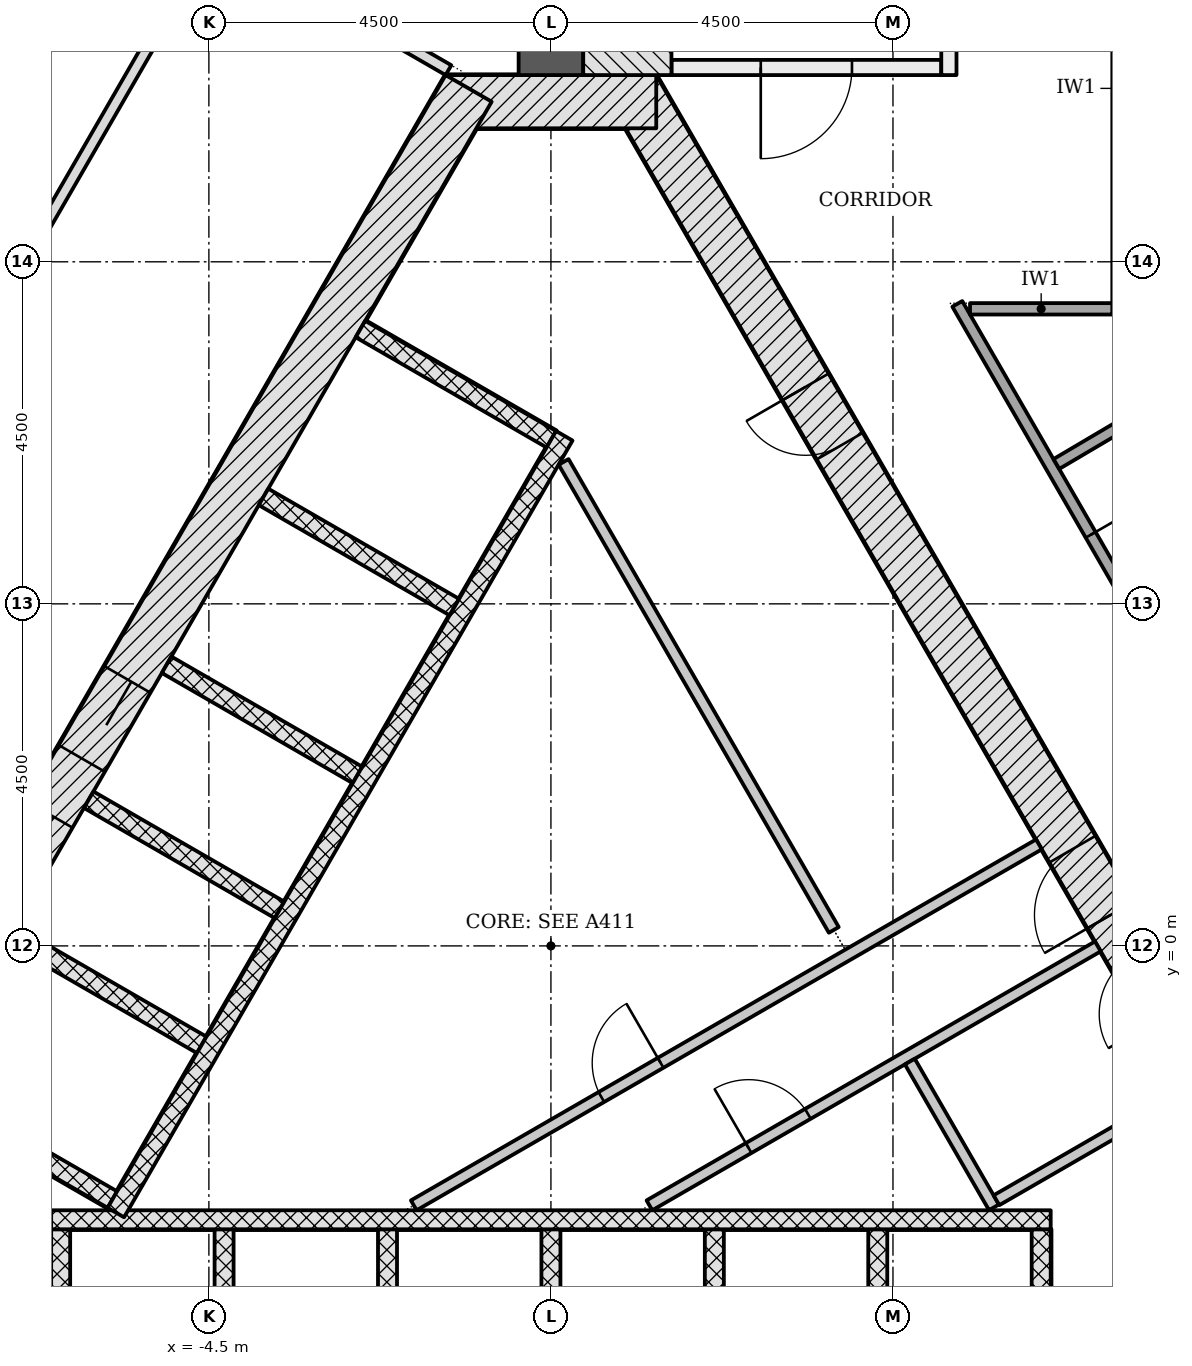
"""IFC4 building model, lengths in metres.
Left out: names, types, materials, properties, quantities, classifications, styles, units other than length and angle.
Written with IfcOpenShell. Run it as: python <this file> out.ifc"""

import sys

from ifc_helpers import new_model, si_unit, direction, frame, frame_2d, origin, place, context, subcontext, project, spatial, rectangle, extrude, element, fill, save


model = new_model("IFC4")
c1 = context("Model", 3, precision=1e-05, world=origin(), true_north=direction((0.0, 1.0)))
c2 = subcontext(c1, "Body", "Model", "MODEL_VIEW")
j1 = project(units=[si_unit("LENGTHUNIT", "METRE"), si_unit("PLANEANGLEUNIT", "RADIAN")], contexts=[c1])
p1 = place(None, origin())
s1 = spatial("IfcSite", under=j1, at=p1, CompositionType="ELEMENT")
p2 = place(p1, origin())
s2 = spatial("IfcBuilding", under=s1, at=p2, CompositionType="ELEMENT")
p3 = place(p2, frame((0.0, 0.0, 79.8)))
s3 = spatial("IfcBuildingStorey", under=s2, at=p3, CompositionType="ELEMENT", Elevation=79.8)
p4 = place(p3, frame((10.311, -4.703, -0.2), z_axis=(0.0, 0.0, 1.0), x_axis=(-0.500001446645, 0.866024568562, 0.0)))
e1 = element("IfcWall", 1, at=p4, inside=s3, PredefinedType="SHEAR", context=c2, shape_type="SweptSolid", body=[
    extrude(rectangle(XDim=18.458, YDim=0.7, at=frame_2d((9.229, 0.0))), origin(), (0.0, 0.0, 1.0), 3.6),
])
p5 = place(p4, frame((5.9, 0.0, 0.2)))
e2 = element("IfcOpeningElement", 2, at=p5, cuts=e1, PredefinedType="OPENING", context=c2, shape_type="SweptSolid", body=[
    extrude(rectangle(XDim=1.0, YDim=2.1, at=frame_2d((0.5, 1.05))), frame((0.0, 0.36, 0.0), z_axis=(0.0, -1.0, 0.0), x_axis=(1.0, 0.0, 0.0)), (0.0, 0.0, 1.0), 0.72),
])
p6 = place(p4, frame((1.452, 0.0, 0.2)))
e3 = element("IfcOpeningElement", 3, at=p6, cuts=e1, PredefinedType="OPENING", context=c2, shape_type="SweptSolid", body=[
    extrude(rectangle(XDim=0.9, YDim=2.1, at=frame_2d((0.45, 1.05))), frame((0.0, 0.36, 0.0), z_axis=(0.0, -1.0, 0.0), x_axis=(1.0, 0.0, 0.0)), (0.0, 0.0, 1.0), 0.72),
])
p7 = place(p4, frame((4.396, 0.0, 0.2)))
e4 = element("IfcOpeningElement", 4, at=p7, cuts=e1, PredefinedType="OPENING", context=c2, shape_type="SweptSolid", body=[
    extrude(rectangle(XDim=0.9, YDim=2.1, at=frame_2d((0.45, 1.05))), frame((0.0, 0.36, 0.0), z_axis=(0.0, -1.0, 0.0), x_axis=(1.0, 0.0, 0.0)), (0.0, 0.0, 1.0), 0.72),
])
p8 = place(p4, frame((13.023, 0.0, 0.2)))
e5 = element("IfcOpeningElement", 5, at=p8, cuts=e1, PredefinedType="OPENING", context=c2, shape_type="SweptSolid", body=[
    extrude(rectangle(XDim=0.9, YDim=2.1, at=frame_2d((0.45, 1.05))), frame((0.0, 0.36, 0.0), z_axis=(0.0, -1.0, 0.0), x_axis=(1.0, 0.0, 0.0)), (0.0, 0.0, 1.0), 0.72),
])
p9 = place(p3, frame((1.386, 11.106, -0.2), z_axis=(0.0, 0.0, 1.0), x_axis=(-1.0, 0.0, 0.0)))
e6 = element("IfcWall", 6, at=p9, inside=s3, PredefinedType="SHEAR", context=c2, shape_type="SweptSolid", body=[
    extrude(rectangle(XDim=2.771, YDim=0.7, at=frame_2d((1.386, 0.0))), origin(), (0.0, 0.0, 1.0), 3.6),
])
p10 = place(p3, frame((-1.083, 11.281, -0.2), z_axis=(0.0, 0.0, 1.0), x_axis=(-0.500001446645, -0.866024568562, 0.0)))
e7 = element("IfcWall", 7, at=p10, inside=s3, PredefinedType="SHEAR", context=c2, shape_type="SweptSolid", body=[
    extrude(rectangle(XDim=18.458, YDim=0.7, at=frame_2d((9.229, 0.0))), origin(), (0.0, 0.0, 1.0), 3.6),
])
p11 = place(p10, frame((8.979, 0.0, 0.2)))
e8 = element("IfcOpeningElement", 8, at=p11, cuts=e7, PredefinedType="OPENING", context=c2, shape_type="SweptSolid", body=[
    extrude(rectangle(XDim=1.2, YDim=2.1, at=frame_2d((0.6, 1.05))), frame((0.0, 0.36, 0.0), z_axis=(0.0, -1.0, 0.0), x_axis=(1.0, 0.0, 0.0)), (0.0, 0.0, 1.0), 0.72),
])
p12 = place(p10, frame((11.029, 0.0, 0.2)))
e9 = element("IfcOpeningElement", 9, at=p12, cuts=e7, PredefinedType="OPENING", context=c2, shape_type="SweptSolid", body=[
    extrude(rectangle(XDim=1.2, YDim=2.1, at=frame_2d((0.6, 1.05))), frame((0.0, 0.36, 0.0), z_axis=(0.0, -1.0, 0.0), x_axis=(1.0, 0.0, 0.0)), (0.0, 0.0, 1.0), 0.72),
])
p13 = place(p3, frame((0.0, 11.456, -0.2), z_axis=(0.0, 0.0, 1.0), x_axis=(0.0, 1.0, 0.0)))
e10 = element("IfcWall", 10, at=p13, inside=s3, PredefinedType="SHEAR", context=c2, shape_type="SweptSolid", body=[
    extrude(rectangle(XDim=13.065, YDim=0.85, at=frame_2d((6.532, 0.0))), origin(), (0.0, 0.0, 1.0), 3.6),
])
for number, where, z_axis, x_axis in (
    (11, (-6.45, -6.228, -0.2), (0.0, 0.0, 1.0), (0.0, 1.0, 0.0)),
    (12, (-4.3, -6.228, -0.2), (0.0, 0.0, 1.0), (0.0, 1.0, 0.0)),
    (13, (-2.15, -6.228, -0.2), (0.0, 0.0, 1.0), (0.0, 1.0, 0.0)),
    (14, (0.0, -6.228, -0.2), (0.0, 0.0, 1.0), (0.0, 1.0, 0.0)),
    (15, (2.15, -6.228, -0.2), (0.0, 0.0, 1.0), (0.0, 1.0, 0.0)),
    (16, (4.3, -6.228, -0.2), (0.0, 0.0, 1.0), (0.0, 1.0, 0.0)),
    (17, (6.45, -6.228, -0.2), (0.0, 0.0, 1.0), (0.0, 1.0, 0.0)),
):
    element("IfcWall", number, at=place(p3, frame(where, z_axis=z_axis, x_axis=x_axis)), inside=s3, PredefinedType="PARTITIONING", context=c2, shape_type="SweptSolid", body=[
        extrude(rectangle(XDim=2.5, YDim=0.25, at=frame_2d((1.25, 0.0))), origin(), (0.0, 0.0, 1.0), 3.6),
    ])
p14 = place(p3, frame((-6.575, -3.603, 0.0), z_axis=(0.0, 0.0, 1.0), x_axis=(1.0, 0.0, 0.0)))
e18 = element("IfcWall", 18, at=p14, inside=s3, PredefinedType="PARTITIONING", context=c2, shape_type="SweptSolid", body=[
    extrude(rectangle(XDim=13.15, YDim=0.25, at=frame_2d((6.575, 0.0))), origin(), (0.0, 0.0, 1.0), 3.4),
])
p15 = place(p3, frame((-2.506, 8.115, -0.2), z_axis=(0.0, 0.0, 1.0), x_axis=(0.865996321171, -0.50005036918, 0.0)))
e19 = element("IfcWall", 19, at=p15, inside=s3, PredefinedType="PARTITIONING", context=c2, shape_type="SweptSolid", body=[
    extrude(rectangle(XDim=2.9, YDim=0.25, at=frame_2d((1.45, 0.0))), origin(), (0.0, 0.0, 1.0), 3.6),
])
for number, where, z_axis, x_axis in (
    (20, (-3.781, 5.907, -0.2), (0.0, 0.0, 1.0), (0.866, -0.5, 0.0)),
    (21, (-5.056, 3.699, -0.2), (0.0, 0.0, 1.0), (0.866, -0.5, 0.0)),
    (22, (-6.081, 1.923, -0.2), (0.0, 0.0, 1.0), (0.866, -0.5, 0.0)),
    (23, (-7.106, 0.148, -0.2), (0.0, 0.0, 1.0), (0.866, -0.5, 0.0)),
    (24, (-8.281, -1.887, -0.2), (0.0, 0.0, 1.0), (0.866, -0.5, 0.0)),
):
    element("IfcWall", number, at=place(p3, frame(where, z_axis=z_axis, x_axis=x_axis)), inside=s3, PredefinedType="PARTITIONING", context=c2, shape_type="SweptSolid", body=[
        extrude(rectangle(XDim=2.9, YDim=0.25, at=frame_2d((1.45, 0.0))), origin(), (0.0, 0.0, 1.0), 3.6),
    ])
p16 = place(p3, frame((0.176, 6.711, 0.0), z_axis=(0.0, 0.0, 1.0), x_axis=(-0.500004227369, -0.866022963098, 0.0)))
e25 = element("IfcWall", 25, at=p16, inside=s3, PredefinedType="PARTITIONING", context=c2, shape_type="SweptSolid", body=[
    extrude(rectangle(XDim=11.8, YDim=0.25, at=frame_2d((5.9, 0.0))), origin(), (0.0, 0.0, 1.0), 3.4),
])
p17 = place(p3, frame((-1.804, -3.413, 0.0), z_axis=(0.0, 0.0, 1.0), x_axis=(0.866035761792, 0.499982058975, 0.0)))
e26 = element("IfcWall", 26, at=p17, inside=s3, PredefinedType="PARTITIONING", context=c2, shape_type="SweptSolid", body=[
    extrude(rectangle(XDim=9.497, YDim=0.15, at=frame_2d((4.749, 0.0))), origin(), (0.0, 0.0, 1.0), 3.4),
])
p18 = place(p17, frame((2.85, 0.0, 0.0)))
e27 = element("IfcOpeningElement", 27, at=p18, cuts=e26, PredefinedType="OPENING", context=c2, shape_type="SweptSolid", body=[
    extrude(rectangle(XDim=0.9, YDim=2.1, at=frame_2d((0.45, 1.05))), frame((0.0, 0.085, 0.0), z_axis=(0.0, -1.0, 0.0), x_axis=(1.0, 0.0, 0.0)), (0.0, 0.0, 1.0), 0.17),
])
p19 = place(p3, frame((3.722, 0.21, 0.0), z_axis=(0.0, 0.0, 1.0), x_axis=(-0.500005825834, 0.866022040212, 0.0)))
e28 = element("IfcWall", 28, at=p19, inside=s3, PredefinedType="PARTITIONING", context=c2, shape_type="SweptSolid", body=[
    extrude(rectangle(XDim=7.11, YDim=0.15, at=frame_2d((3.555, 0.0))), origin(), (0.0, 0.0, 1.0), 3.4),
])
p20 = place(p3, frame((1.296, -3.413, 0.0), z_axis=(0.0, 0.0, 1.0), x_axis=(0.866029230515, 0.49999337185, 0.0)))
e29 = element("IfcWall", 29, at=p20, inside=s3, PredefinedType="PARTITIONING", context=c2, shape_type="SweptSolid", body=[
    extrude(rectangle(XDim=6.812, YDim=0.15, at=frame_2d((3.406, 0.0))), origin(), (0.0, 0.0, 1.0), 3.4),
])
p21 = place(p20, frame((1.507, 0.0, 0.0)))
e30 = element("IfcOpeningElement", 30, at=p21, cuts=e29, PredefinedType="OPENING", context=c2, shape_type="SweptSolid", body=[
    extrude(rectangle(XDim=0.9, YDim=2.1, at=frame_2d((0.45, 1.05))), frame((0.0, 0.085, 0.0), z_axis=(0.0, -1.0, 0.0), x_axis=(1.0, 0.0, 0.0)), (0.0, 0.0, 1.0), 0.17),
])
p22 = place(p3, frame((5.829, -3.439, 0.0), z_axis=(0.0, 0.0, 1.0), x_axis=(-0.49995790319, 0.866049707025, 0.0)))
e31 = element("IfcWall", 31, at=p22, inside=s3, PredefinedType="PARTITIONING", context=c2, shape_type="SweptSolid", body=[
    extrude(rectangle(XDim=2.214, YDim=0.15, at=frame_2d((1.107, 0.0))), origin(), (0.0, 0.0, 1.0), 3.4),
])
p23 = place(p3, frame((5.862, -3.346, 0.0), z_axis=(0.0, 0.0, 1.0), x_axis=(0.866011447264, 0.500024172624, 0.0)))
e32 = element("IfcWall", 32, at=p23, inside=s3, PredefinedType="PARTITIONING", context=c2, shape_type="SweptSolid", body=[
    extrude(rectangle(XDim=2.825, YDim=0.15, at=frame_2d((1.413, 0.0))), origin(), (0.0, 0.0, 1.0), 3.4),
])
p24 = place(p3, frame((5.135, 11.556, -0.2), z_axis=(0.0, 0.0, 1.0), x_axis=(-1.0, 0.0, 0.0)))
e33 = element("IfcWall", 33, at=p24, inside=s3, PredefinedType="SHEAR", context=c2, shape_type="SweptSolid", body=[
    extrude(rectangle(XDim=3.55, YDim=0.2, at=frame_2d((1.775, 0.0))), origin(), (0.0, 0.0, 1.0), 3.6),
])
p25 = place(p24, frame((1.175, 0.0, 0.2)))
e34 = element("IfcOpeningElement", 34, at=p25, cuts=e33, PredefinedType="OPENING", context=c2, shape_type="SweptSolid", body=[
    extrude(rectangle(XDim=1.2, YDim=2.1, at=frame_2d((0.6, 1.05))), frame((0.0, 0.11, 0.0), z_axis=(0.0, -1.0, 0.0), x_axis=(1.0, 0.0, 0.0)), (0.0, 0.0, 1.0), 0.22),
])
p26 = place(p3, frame((5.236, 11.456, -0.2), z_axis=(0.0, 0.0, 1.0), x_axis=(0.0, 1.0, 0.0)))
e35 = element("IfcWall", 35, at=p26, inside=s3, PredefinedType="SHEAR", context=c2, shape_type="SweptSolid", body=[
    extrude(rectangle(XDim=5.6, YDim=0.2, at=frame_2d((2.8, 0.0))), origin(), (0.0, 0.0, 1.0), 3.6),
])
p27 = place(p26, frame((0.45, 0.0, 0.2)))
e36 = element("IfcOpeningElement", 36, at=p27, cuts=e35, PredefinedType="OPENING", context=c2, shape_type="SweptSolid", body=[
    extrude(rectangle(XDim=1.2, YDim=2.1, at=frame_2d((0.6, 1.05))), frame((0.0, 0.11, 0.0), z_axis=(0.0, -1.0, 0.0), x_axis=(1.0, 0.0, 0.0)), (0.0, 0.0, 1.0), 0.22),
])
p28 = place(p3, frame((1.005, 11.456, -0.2), z_axis=(0.0, 0.0, 1.0), x_axis=(0.0, 1.0, 0.0)))
e37 = element("IfcWall", 37, at=p28, inside=s3, PredefinedType="SHEAR", context=c2, shape_type="SweptSolid", body=[
    extrude(rectangle(XDim=7.2, YDim=1.161, at=frame_2d((3.6, 0.0))), origin(), (0.0, 0.0, 1.0), 3.6),
])
p29 = place(p3, frame((-16.256, -3.149, 0.0), z_axis=(0.0, 0.0, 1.0), x_axis=(0.499999683919, 0.866025586274, 0.0)))
e38 = element("IfcWall", 38, at=p29, inside=s3, PredefinedType="PARTITIONING", context=c2, shape_type="SweptSolid", body=[
    extrude(rectangle(XDim=22.234, YDim=0.15, at=frame_2d((11.117, 0.0))), origin(), (0.0, 0.0, 1.0), 2.778),
])
p30 = place(p29, frame((13.553, 0.0, 0.0)))
e39 = element("IfcOpeningElement", 39, at=p30, cuts=e38, PredefinedType="OPENING", context=c2, shape_type="SweptSolid", body=[
    extrude(rectangle(XDim=1.0, YDim=2.1, at=frame_2d((0.5, 1.05))), frame((0.0, 0.085, 0.0), z_axis=(0.0, -1.0, 0.0), x_axis=(1.0, 0.0, 0.0)), (0.0, 0.0, 1.0), 0.17),
])
p31 = place(p29, frame((11.56, 0.0, 0.0)))
e40 = element("IfcOpeningElement", 40, at=p31, cuts=e38, PredefinedType="OPENING", context=c2, shape_type="SweptSolid", body=[
    extrude(rectangle(XDim=1.0, YDim=2.1, at=frame_2d((0.5, 1.05))), frame((0.0, 0.085, 0.0), z_axis=(0.0, -1.0, 0.0), x_axis=(1.0, 0.0, 0.0)), (0.0, 0.0, 1.0), 0.17),
])
p32 = place(p29, frame((3.446, 0.0, 0.0)))
e41 = element("IfcOpeningElement", 41, at=p32, cuts=e38, PredefinedType="OPENING", context=c2, shape_type="SweptSolid", body=[
    extrude(rectangle(XDim=1.5, YDim=2.1, at=frame_2d((0.75, 1.05))), frame((0.0, 0.085, 0.0), z_axis=(0.0, -1.0, 0.0), x_axis=(1.0, 0.0, 0.0)), (0.0, 0.0, 1.0), 0.17),
])
p33 = place(p3, frame((-4.407, 13.374, 0.0), z_axis=(0.0, 0.0, 1.0), x_axis=(-0.499997181693, -0.866027030928, 0.0)))
e42 = element("IfcWall", 42, at=p33, inside=s3, PredefinedType="PARTITIONING", context=c2, shape_type="SweptSolid", body=[
    extrude(rectangle(XDim=16.77, YDim=0.15, at=frame_2d((8.385, 0.0))), origin(), (0.0, 0.0, 1.0), 2.778),
])
p34 = place(p33, frame((8.879, 0.0, 0.0)))
e43 = element("IfcOpeningElement", 43, at=p34, cuts=e42, PredefinedType="OPENING", context=c2, shape_type="SweptSolid", body=[
    extrude(rectangle(XDim=1.0, YDim=2.1, at=frame_2d((0.5, 1.05))), frame((0.0, 0.085, 0.0), z_axis=(0.0, -1.0, 0.0), x_axis=(1.0, 0.0, 0.0)), (0.0, 0.0, 1.0), 0.17),
])
p35 = place(p3, frame((5.346, 8.446, 0.0), z_axis=(0.0, 0.0, 1.0), x_axis=(0.500008781656, -0.866020333634, 0.0)))
e44 = element("IfcWall", 44, at=p35, inside=s3, PredefinedType="PARTITIONING", context=c2, shape_type="SweptSolid", body=[
    extrude(rectangle(XDim=15.057, YDim=0.15, at=frame_2d((7.528, 0.0))), origin(), (0.0, 0.0, 1.0), 2.778),
])
p36 = place(p35, frame((12.552, 0.0, 0.0)))
e45 = element("IfcOpeningElement", 45, at=p36, cuts=e44, PredefinedType="OPENING", context=c2, shape_type="SweptSolid", body=[
    extrude(rectangle(XDim=1.0, YDim=2.1, at=frame_2d((0.5, 1.05))), frame((0.0, 0.085, 0.0), z_axis=(0.0, -1.0, 0.0), x_axis=(1.0, 0.0, 0.0)), (0.0, 0.0, 1.0), 0.17),
])
p37 = place(p35, frame((9.365, 0.0, 0.0)))
e46 = element("IfcOpeningElement", 46, at=p37, cuts=e44, PredefinedType="OPENING", context=c2, shape_type="SweptSolid", body=[
    extrude(rectangle(XDim=1.0, YDim=2.1, at=frame_2d((0.5, 1.05))), frame((0.0, 0.085, 0.0), z_axis=(0.0, -1.0, 0.0), x_axis=(1.0, 0.0, 0.0)), (0.0, 0.0, 1.0), 0.17),
])
p38 = place(p35, frame((6.816, 0.0, 0.0)))
e47 = element("IfcOpeningElement", 47, at=p38, cuts=e44, PredefinedType="OPENING", context=c2, shape_type="SweptSolid", body=[
    extrude(rectangle(XDim=1.0, YDim=2.1, at=frame_2d((0.5, 1.05))), frame((0.0, 0.085, 0.0), z_axis=(0.0, -1.0, 0.0), x_axis=(1.0, 0.0, 0.0)), (0.0, 0.0, 1.0), 0.17),
])
p39 = place(p35, frame((3.509, 0.0, 0.0)))
e48 = element("IfcOpeningElement", 48, at=p39, cuts=e44, PredefinedType="OPENING", context=c2, shape_type="SweptSolid", body=[
    extrude(rectangle(XDim=1.5, YDim=2.1, at=frame_2d((0.75, 1.05))), frame((0.0, 0.085, 0.0), z_axis=(0.0, -1.0, 0.0), x_axis=(1.0, 0.0, 0.0)), (0.0, 0.0, 1.0), 0.17),
])
p40 = place(p3, frame((-4.379, 13.271, 0.0), z_axis=(0.0, 0.0, 1.0), x_axis=(0.866019471182, -0.500010275428, 0.0)))
e49 = element("IfcWall", 49, at=p40, inside=s3, PredefinedType="PARTITIONING", context=c2, shape_type="SweptSolid", body=[
    extrude(rectangle(XDim=3.5, YDim=0.15, at=frame_2d((1.75, 0.0))), origin(), (0.0, 0.0, 1.0), 3.4),
])
p41 = place(p3, frame((5.514, 8.381, 0.0), z_axis=(0.0, 0.0, 1.0), x_axis=(1.0, 0.0, 0.0)))
e50 = element("IfcWall", 50, at=p41, inside=s3, PredefinedType="PARTITIONING", context=c2, shape_type="SweptSolid", body=[
    extrude(rectangle(XDim=1.872, YDim=0.15, at=frame_2d((0.936, 0.0))), origin(), (0.0, 0.0, 1.0), 3.4),
])
p42 = place(p3, frame((13.421, 10.338, 0.0), z_axis=(0.0, 0.0, 1.0), x_axis=(-0.861114991514, -0.508410239266, 0.0)))
e51 = element("IfcWall", 51, at=p42, inside=s3, PredefinedType="PARTITIONING", context=c2, shape_type="SweptSolid", body=[
    extrude(rectangle(XDim=7.863, YDim=0.15, at=frame_2d((3.932, 0.0))), origin(), (0.0, 0.0, 1.0), 2.778),
])
p43 = place(p11, origin())
e52 = element("IfcDoor", 52, at=p43, inside=s3, OperationType="DOUBLE_DOOR_SLIDING", PredefinedType="DOOR", context=c2, shape_type="SweptSolid", body=[
    extrude(rectangle(XDim=1.2, YDim=2.1, at=frame_2d((0.6, 1.05))), frame((0.0, 0.025, 0.0), z_axis=(0.0, -1.0, 0.0), x_axis=(1.0, 0.0, 0.0)), (0.0, 0.0, 1.0), 0.05),
])
fill(e8, e52)
p44 = place(p5, origin())
e53 = element("IfcDoor", 53, at=p44, inside=s3, OperationType="SINGLE_SWING_LEFT", PredefinedType="DOOR", context=c2, shape_type="SweptSolid", body=[
    extrude(rectangle(XDim=1.0, YDim=2.1, at=frame_2d((0.5, 1.05))), frame((0.0, 0.075, 0.0), z_axis=(0.0, -1.0, 0.0), x_axis=(1.0, 0.0, 0.0)), (0.0, 0.0, 1.0), 0.15),
])
fill(e2, e53)
p45 = place(p8, origin())
e54 = element("IfcDoor", 54, at=p45, inside=s3, OperationType="SINGLE_SWING_RIGHT", PredefinedType="DOOR", context=c2, shape_type="SweptSolid", body=[
    extrude(rectangle(XDim=0.9, YDim=2.1, at=frame_2d((0.45, 1.05))), frame((0.0, 0.075, 0.0), z_axis=(0.0, -1.0, 0.0), x_axis=(1.0, 0.0, 0.0)), (0.0, 0.0, 1.0), 0.15),
])
fill(e5, e54)
p46 = place(p21, origin())
e55 = element("IfcDoor", 55, at=p46, inside=s3, OperationType="SINGLE_SWING_LEFT", PredefinedType="DOOR", context=c2, shape_type="SweptSolid", body=[
    extrude(rectangle(XDim=0.9, YDim=2.1, at=frame_2d((0.45, 1.05))), frame((0.0, 0.025, 0.0), z_axis=(0.0, -1.0, 0.0), x_axis=(1.0, 0.0, 0.0)), (0.0, 0.0, 1.0), 0.05),
])
fill(e30, e55)
p47 = place(p18, origin())
e56 = element("IfcDoor", 56, at=p47, inside=s3, OperationType="SINGLE_SWING_RIGHT", PredefinedType="DOOR", context=c2, shape_type="SweptSolid", body=[
    extrude(rectangle(XDim=0.9, YDim=2.1, at=frame_2d((0.45, 1.05))), frame((0.0, 0.025, 0.0), z_axis=(0.0, -1.0, 0.0), x_axis=(1.0, 0.0, 0.0)), (0.0, 0.0, 1.0), 0.05),
])
fill(e27, e56)
p48 = place(p25, origin())
e57 = element("IfcDoor", 57, at=p48, inside=s3, OperationType="SINGLE_SWING_RIGHT", PredefinedType="DOOR", context=c2, shape_type="SweptSolid", body=[
    extrude(rectangle(XDim=1.2, YDim=2.1, at=frame_2d((0.6, 1.05))), frame((0.0, 0.025, 0.0), z_axis=(0.0, -1.0, 0.0), x_axis=(1.0, 0.0, 0.0)), (0.0, 0.0, 1.0), 0.05),
])
fill(e34, e57)
p49 = place(p39, origin())
e58 = element("IfcDoor", 58, at=p49, inside=s3, OperationType="DOUBLE_DOOR_SINGLE_SWING", PredefinedType="DOOR", context=c2, shape_type="SweptSolid", body=[
    extrude(rectangle(XDim=1.5, YDim=2.1, at=frame_2d((0.75, 1.05))), frame((0.0, 0.025, 0.0), z_axis=(0.0, -1.0, 0.0), x_axis=(1.0, 0.0, 0.0)), (0.0, 0.0, 1.0), 0.05),
])
fill(e48, e58)
save(model, sys.argv[1])
